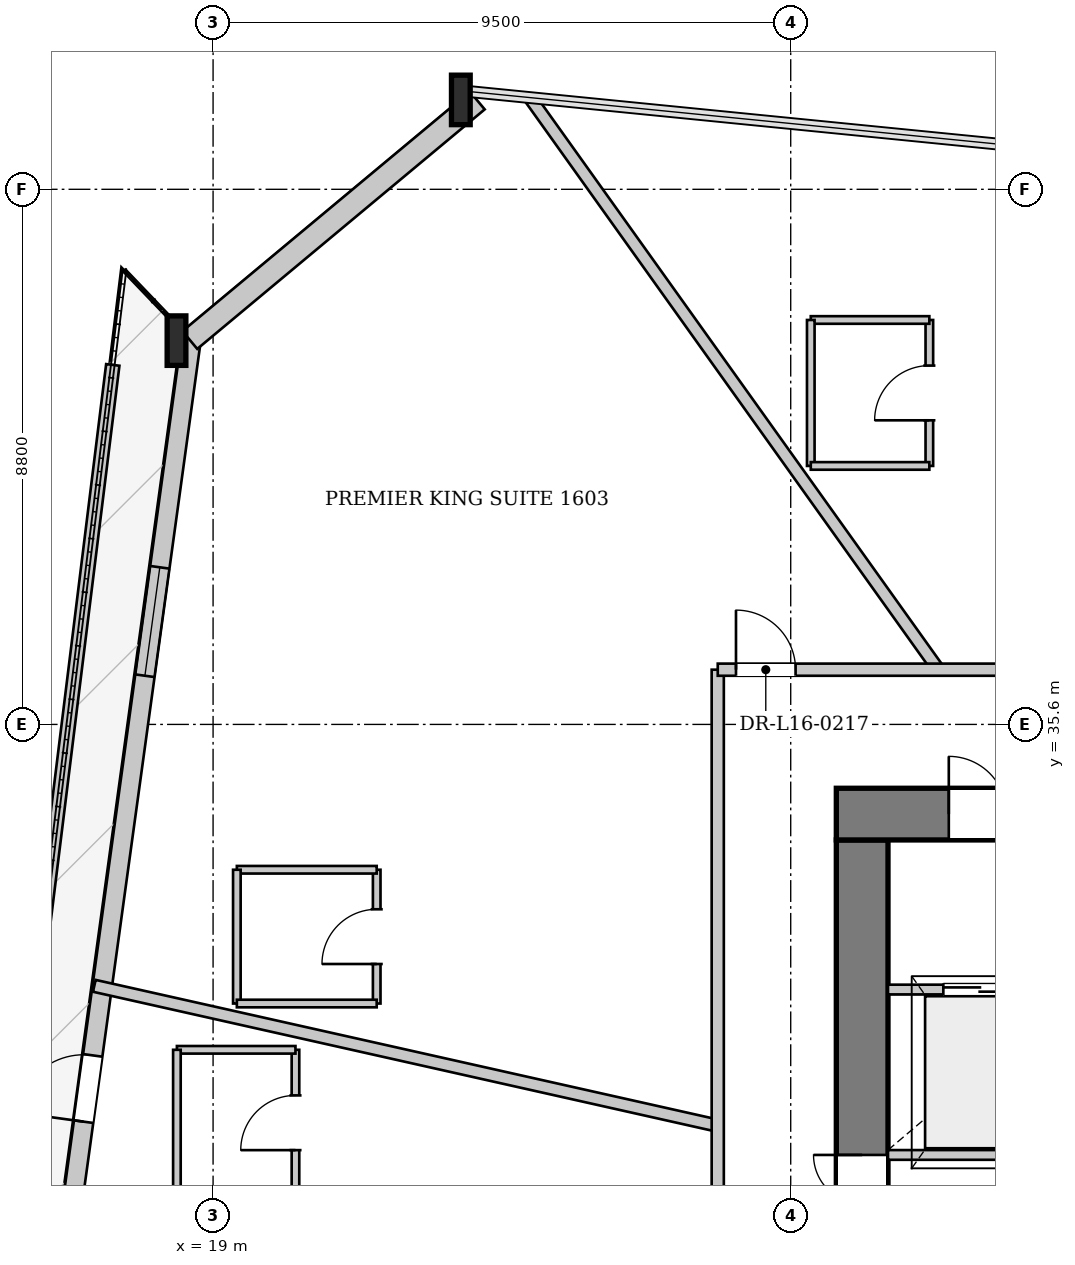
"""IFC4 building model, lengths in metres.
Left out: names, types, materials, properties, quantities, classifications, styles, units other than length and angle.
Written with IfcOpenShell. Run it as: python <this file> out.ifc"""

import sys

from ifc_helpers import new_model, si_unit, direction, frame, frame_2d, origin, origin_2d, place, context, subcontext, project, spatial, rectangle, i_section, extrude, source, transform, mapped, element, fill, save


model = new_model("IFC4")
c1 = context("Model", 3, precision=1e-05, world=origin(), true_north=direction((0.0, 1.0)))
c2 = subcontext(c1, "Body", "Model", "MODEL_VIEW")
j1 = project(units=[si_unit("LENGTHUNIT", "METRE"), si_unit("PLANEANGLEUNIT", "RADIAN")], contexts=[c1])
p1 = place(None, origin())
s1 = spatial("IfcSite", under=j1, at=p1, CompositionType="ELEMENT")
p2 = place(p1, origin())
s2 = spatial("IfcBuilding", under=s1, at=p2, CompositionType="ELEMENT")
p3 = place(p2, frame((0.0, 0.0, 64.8)))
s3 = spatial("IfcBuildingStorey", under=s2, at=p3, CompositionType="ELEMENT", Elevation=64.8)
m1 = source(origin(), c2, "Body", "SweptSolid", [
    extrude(i_section(OverallWidth=0.308, OverallDepth=0.814, WebThickness=0.021, FlangeThickness=0.04, at=origin_2d()), origin(), (0.0, 0.0, 1.0), 3.409),
])
p4 = place(p3, frame((23.224, 46.006, 0.0), z_axis=(-0.087656538504, -0.079922138048, 0.992939465983), x_axis=(0.673753857686, -0.738955843913, 0.0)))
e1 = element("IfcColumn", 1, at=p4, inside=s3, PredefinedType="COLUMN", context=c2, shape_type="MappedRepresentation", body=[
    mapped(m1, transform((0.0, 0.0, 0.0), x_axis=(1.0, 0.0, 0.0), y_axis=(0.0, 1.0, 0.0), z_axis=(0.0, 0.0, 1.0), scale=1.0)),
])
m2 = source(origin(), c2, "Body", "SweptSolid", [
    extrude(i_section(OverallWidth=0.308, OverallDepth=0.814, WebThickness=0.021, FlangeThickness=0.04, at=origin_2d()), origin(), (0.0, 0.0, 1.0), 3.405),
])
p5 = place(p3, frame((18.497, 42.067, 0.0), z_axis=(-0.057575852548, -0.091562096767, 0.994133493872), x_axis=(0.84654266508, -0.532320877102, 0.0)))
e2 = element("IfcColumn", 2, at=p5, inside=s3, PredefinedType="COLUMN", context=c2, shape_type="MappedRepresentation", body=[
    mapped(m2, transform((0.0, 0.0, 0.0), x_axis=(1.0, 0.0, 0.0), y_axis=(0.0, 1.0, 0.0), z_axis=(0.0, 0.0, 1.0), scale=1.0)),
])
p6 = place(p3, frame((16.141, 23.761, 0.0), z_axis=(0.0, 0.0, 1.0), x_axis=(0.136198703883, 0.990681539679, 0.0)))
e3 = element("IfcWall", 3, at=p6, inside=s3, PredefinedType="SOLIDWALL", context=c2, shape_type="SweptSolid", body=[
    extrude(rectangle(XDim=18.456, YDim=0.32, at=frame_2d((9.228, 0.0))), origin(), (0.0, 0.0, 1.0), 2.592),
])
p7 = place(p6, frame((5.356, 0.0, 0.0)))
e4 = element("IfcOpeningElement", 4, at=p7, cuts=e3, PredefinedType="OPENING", context=c2, shape_type="SweptSolid", body=[
    extrude(rectangle(XDim=1.1, YDim=2.3, at=frame_2d((0.55, 1.15))), frame((0.0, 0.17, 0.0), z_axis=(0.0, -1.0, 0.0), x_axis=(1.0, 0.0, 0.0)), (0.0, 0.0, 1.0), 0.34),
])
p8 = place(p6, frame((12.758, 0.0, 0.272)))
e5 = element("IfcOpeningElement", 5, at=p8, cuts=e3, PredefinedType="OPENING", context=c2, shape_type="SweptSolid", body=[
    extrude(rectangle(XDim=1.8, YDim=2.2, at=frame_2d((0.9, 1.1))), frame((0.0, 0.17, 0.0), z_axis=(0.0, -1.0, 0.0), x_axis=(1.0, 0.0, 0.0)), (0.0, 0.0, 1.0), 0.34),
])
p9 = place(p3, frame((18.618, 41.921, 0.0), z_axis=(0.0, 0.0, 1.0), x_axis=(0.768273310294, 0.640121957668, 0.0)))
e6 = element("IfcWall", 6, at=p9, inside=s3, PredefinedType="SOLIDWALL", context=c2, shape_type="SweptSolid", body=[
    extrude(rectangle(XDim=6.154, YDim=0.38, at=frame_2d((3.077, 0.0))), origin(), (0.0, 0.0, 1.0), 2.592),
])
p10 = place(p3, frame((17.351, 41.512, 0.0), z_axis=(0.0, 0.0, 1.0), x_axis=(-0.122727522737, -0.992440403834, 0.0)))
e7 = element("IfcWall", 7, at=p10, inside=s3, PredefinedType="PARAPET", context=c2, shape_type="SweptSolid", body=[
    extrude(rectangle(XDim=16.414, YDim=0.22, at=frame_2d((8.207, 0.0))), origin(), (0.0, 0.0, 1.0), 0.3),
])
p11 = place(p3, frame((29.675, 19.5, 0.0), z_axis=(0.0, 0.0, 1.0), x_axis=(0.0, 1.0, 0.0)))
e8 = element("IfcWall", 8, at=p11, inside=s3, PredefinedType="SHEAR", context=c2, shape_type="SweptSolid", body=[
    extrude(rectangle(XDim=14.2, YDim=0.85, at=frame_2d((7.1, 0.0))), origin(), (0.0, 0.0, 1.0), 3.3),
])
p12 = place(p11, frame((7.42, 0.0, 0.0)))
e9 = element("IfcOpeningElement", 9, at=p12, cuts=e8, PredefinedType="OPENING", context=c2, shape_type="SweptSolid", body=[
    extrude(rectangle(XDim=1.6, YDim=2.2, at=frame_2d((0.8, 1.1))), frame((0.0, 0.435, 0.0), z_axis=(0.0, -1.0, 0.0), x_axis=(1.0, 0.0, 0.0)), (0.0, 0.0, 1.0), 0.87),
])
p13 = place(p3, frame((29.25, 34.125, 0.0), z_axis=(0.0, 0.0, 1.0), x_axis=(1.0, 0.0, 0.0)))
e10 = element("IfcWall", 10, at=p13, inside=s3, PredefinedType="SHEAR", context=c2, shape_type="SweptSolid", body=[
    extrude(rectangle(XDim=17.5, YDim=0.85, at=frame_2d((8.75, 0.0))), origin(), (0.0, 0.0, 1.0), 3.3),
])
p14 = place(p13, frame((1.85, 0.0, 0.0)))
e11 = element("IfcOpeningElement", 11, at=p14, cuts=e10, PredefinedType="OPENING", context=c2, shape_type="SweptSolid", body=[
    extrude(rectangle(XDim=0.95, YDim=2.1, at=frame_2d((0.475, 1.05))), frame((0.0, 0.435, 0.0), z_axis=(0.0, -1.0, 0.0), x_axis=(1.0, 0.0, 0.0)), (0.0, 0.0, 1.0), 0.87),
])
p15 = place(p13, frame((4.23, 0.0, 0.0)))
e12 = element("IfcOpeningElement", 12, at=p15, cuts=e10, PredefinedType="OPENING", context=c2, shape_type="SweptSolid", body=[
    extrude(rectangle(XDim=1.32, YDim=2.2, at=frame_2d((0.66, 1.1))), frame((0.0, 0.435, 0.0), z_axis=(0.0, -1.0, 0.0), x_axis=(1.0, 0.0, 0.0)), (0.0, 0.0, 1.0), 0.87),
])
p16 = place(p13, frame((15.3, 0.0, 0.0)))
e13 = element("IfcOpeningElement", 13, at=p16, cuts=e10, PredefinedType="OPENING", context=c2, shape_type="SweptSolid", body=[
    extrude(rectangle(XDim=0.95, YDim=2.1, at=frame_2d((0.475, 1.05))), frame((0.0, 0.435, 0.0), z_axis=(0.0, -1.0, 0.0), x_axis=(1.0, 0.0, 0.0)), (0.0, 0.0, 1.0), 0.87),
])
p17 = place(p3, frame((30.1, 28.52, 0.0), z_axis=(0.0, 0.0, 1.0), x_axis=(1.0, 0.0, 0.0)))
e14 = element("IfcWall", 14, at=p17, inside=s3, PredefinedType="PARTITIONING", context=c2, shape_type="SweptSolid", body=[
    extrude(rectangle(XDim=3.02, YDim=0.16, at=frame_2d((1.51, 0.0))), origin(), (0.0, 0.0, 1.0), 3.3),
])
p18 = place(p3, frame((30.1, 31.24, 0.0), z_axis=(0.0, 0.0, 1.0), x_axis=(1.0, 0.0, 0.0)))
e15 = element("IfcWall", 15, at=p18, inside=s3, PredefinedType="PARTITIONING", context=c2, shape_type="SweptSolid", body=[
    extrude(rectangle(XDim=3.02, YDim=0.16, at=frame_2d((1.51, 0.0))), origin(), (0.0, 0.0, 1.0), 3.3),
])
p19 = place(p18, frame((0.91, 0.0, 0.0)))
e16 = element("IfcOpeningElement", 16, at=p19, cuts=e15, PredefinedType="OPENING", context=c2, shape_type="SweptSolid", body=[
    extrude(rectangle(XDim=1.2, YDim=2.2, at=frame_2d((0.6, 1.1))), frame((0.0, 0.09, 0.0), z_axis=(0.0, -1.0, 0.0), x_axis=(1.0, 0.0, 0.0)), (0.0, 0.0, 1.0), 0.18),
])
p20 = place(p3, frame((30.929, 36.5, 0.0), z_axis=(0.0, 0.0, 1.0), x_axis=(-0.581222159054, 0.8137449243, 0.0)))
e17 = element("IfcWall", 17, at=p20, inside=s3, PredefinedType="PARTITIONING", context=c2, shape_type="SweptSolid", body=[
    extrude(rectangle(XDim=11.522, YDim=0.2, at=frame_2d((5.761, 0.0))), origin(), (0.0, 0.0, 1.0), 3.3),
])
p21 = place(p3, frame((27.3, 29.0, 0.0), z_axis=(0.0, 0.0, 1.0), x_axis=(-0.975741680271, 0.218925040554, 0.0)))
e18 = element("IfcWall", 18, at=p21, inside=s3, PredefinedType="PARTITIONING", context=c2, shape_type="SweptSolid", body=[
    extrude(rectangle(XDim=10.508, YDim=0.2, at=frame_2d((5.254, 0.0))), origin(), (0.0, 0.0, 1.0), 3.3),
])
p22 = place(p3, frame((30.78, 39.851, 0.0), z_axis=(0.0, 0.0, 1.0), x_axis=(0.0, 1.0, 0.0)))
e19 = element("IfcWall", 19, at=p22, inside=s3, PredefinedType="PARTITIONING", context=c2, shape_type="SweptSolid", body=[
    extrude(rectangle(XDim=2.4, YDim=0.125, at=frame_2d((1.2, 0.0))), origin(), (0.0, 0.0, 1.0), 3.3),
])
p23 = place(p22, frame((0.75, 0.0, 0.0)))
e20 = element("IfcOpeningElement", 20, at=p23, cuts=e19, PredefinedType="OPENING", context=c2, shape_type="SweptSolid", body=[
    extrude(rectangle(XDim=0.9, YDim=2.1, at=frame_2d((0.45, 1.05))), frame((0.0, 0.073, 0.0), z_axis=(0.0, -1.0, 0.0), x_axis=(1.0, 0.0, 0.0)), (0.0, 0.0, 1.0), 0.145),
])
p24 = place(p3, frame((30.78, 42.251, 0.0), z_axis=(0.0, 0.0, 1.0), x_axis=(-1.0, 0.0, 0.0)))
e21 = element("IfcWall", 21, at=p24, inside=s3, PredefinedType="PARTITIONING", context=c2, shape_type="SweptSolid", body=[
    extrude(rectangle(XDim=1.95, YDim=0.125, at=frame_2d((0.975, 0.0))), origin(), (0.0, 0.0, 1.0), 3.3),
])
p25 = place(p3, frame((28.83, 42.251, 0.0), z_axis=(0.0, 0.0, 1.0), x_axis=(0.0, -1.0, 0.0)))
e22 = element("IfcWall", 22, at=p25, inside=s3, PredefinedType="PARTITIONING", context=c2, shape_type="SweptSolid", body=[
    extrude(rectangle(XDim=2.4, YDim=0.125, at=frame_2d((1.2, 0.0))), origin(), (0.0, 0.0, 1.0), 3.3),
])
p26 = place(p3, frame((28.83, 39.851, 0.0), z_axis=(0.0, 0.0, 1.0), x_axis=(1.0, 0.0, 0.0)))
e23 = element("IfcWall", 23, at=p26, inside=s3, PredefinedType="PARTITIONING", context=c2, shape_type="SweptSolid", body=[
    extrude(rectangle(XDim=1.95, YDim=0.125, at=frame_2d((0.975, 0.0))), origin(), (0.0, 0.0, 1.0), 3.3),
])
p27 = place(p3, frame((21.691, 31.01, 0.0), z_axis=(0.0, 0.0, 1.0), x_axis=(0.0, 1.0, 0.0)))
e24 = element("IfcWall", 24, at=p27, inside=s3, PredefinedType="PARTITIONING", context=c2, shape_type="SweptSolid", body=[
    extrude(rectangle(XDim=2.2, YDim=0.125, at=frame_2d((1.1, 0.0))), origin(), (0.0, 0.0, 1.0), 3.3),
])
p28 = place(p27, frame((0.65, 0.0, 0.0)))
e25 = element("IfcOpeningElement", 25, at=p28, cuts=e24, PredefinedType="OPENING", context=c2, shape_type="SweptSolid", body=[
    extrude(rectangle(XDim=0.9, YDim=2.1, at=frame_2d((0.45, 1.05))), frame((0.0, 0.073, 0.0), z_axis=(0.0, -1.0, 0.0), x_axis=(1.0, 0.0, 0.0)), (0.0, 0.0, 1.0), 0.145),
])
p29 = place(p3, frame((21.691, 33.21, 0.0), z_axis=(0.0, 0.0, 1.0), x_axis=(-1.0, 0.0, 0.0)))
e26 = element("IfcWall", 26, at=p29, inside=s3, PredefinedType="PARTITIONING", context=c2, shape_type="SweptSolid", body=[
    extrude(rectangle(XDim=2.3, YDim=0.125, at=frame_2d((1.15, 0.0))), origin(), (0.0, 0.0, 1.0), 3.3),
])
p30 = place(p3, frame((19.391, 33.21, 0.0), z_axis=(0.0, 0.0, 1.0), x_axis=(0.0, -1.0, 0.0)))
e27 = element("IfcWall", 27, at=p30, inside=s3, PredefinedType="PARTITIONING", context=c2, shape_type="SweptSolid", body=[
    extrude(rectangle(XDim=2.2, YDim=0.125, at=frame_2d((1.1, 0.0))), origin(), (0.0, 0.0, 1.0), 3.3),
])
p31 = place(p3, frame((19.391, 31.01, 0.0), z_axis=(0.0, 0.0, 1.0), x_axis=(1.0, 0.0, 0.0)))
e28 = element("IfcWall", 28, at=p31, inside=s3, PredefinedType="PARTITIONING", context=c2, shape_type="SweptSolid", body=[
    extrude(rectangle(XDim=2.3, YDim=0.125, at=frame_2d((1.15, 0.0))), origin(), (0.0, 0.0, 1.0), 3.3),
])
p32 = place(p3, frame((20.355, 27.849, 0.0), z_axis=(0.0, 0.0, 1.0), x_axis=(0.0, 1.0, 0.0)))
e29 = element("IfcWall", 29, at=p32, inside=s3, PredefinedType="PARTITIONING", context=c2, shape_type="SweptSolid", body=[
    extrude(rectangle(XDim=2.4, YDim=0.125, at=frame_2d((1.2, 0.0))), origin(), (0.0, 0.0, 1.0), 3.3),
])
p33 = place(p32, frame((0.75, 0.0, 0.0)))
e30 = element("IfcOpeningElement", 30, at=p33, cuts=e29, PredefinedType="OPENING", context=c2, shape_type="SweptSolid", body=[
    extrude(rectangle(XDim=0.9, YDim=2.1, at=frame_2d((0.45, 1.05))), frame((0.0, 0.073, 0.0), z_axis=(0.0, -1.0, 0.0), x_axis=(1.0, 0.0, 0.0)), (0.0, 0.0, 1.0), 0.145),
])
p34 = place(p3, frame((20.355, 30.249, 0.0), z_axis=(0.0, 0.0, 1.0), x_axis=(-1.0, 0.0, 0.0)))
e31 = element("IfcWall", 31, at=p34, inside=s3, PredefinedType="PARTITIONING", context=c2, shape_type="SweptSolid", body=[
    extrude(rectangle(XDim=1.95, YDim=0.125, at=frame_2d((0.975, 0.0))), origin(), (0.0, 0.0, 1.0), 3.3),
])
p35 = place(p3, frame((18.405, 30.249, 0.0), z_axis=(0.0, 0.0, 1.0), x_axis=(0.0, -1.0, 0.0)))
e32 = element("IfcWall", 32, at=p35, inside=s3, PredefinedType="PARTITIONING", context=c2, shape_type="SweptSolid", body=[
    extrude(rectangle(XDim=2.4, YDim=0.125, at=frame_2d((1.2, 0.0))), origin(), (0.0, 0.0, 1.0), 3.3),
])
p36 = place(p3, frame((27.3, 16.7, 0.0), z_axis=(0.0, 0.0, 1.0), x_axis=(0.0, 1.0, 0.0)))
e33 = element("IfcWall", 33, at=p36, inside=s3, PredefinedType="PARTITIONING", context=c2, shape_type="SweptSolid", body=[
    extrude(rectangle(XDim=19.8, YDim=0.2, at=frame_2d((9.9, 0.0))), origin(), (0.0, 0.0, 1.0), 3.3),
])
p37 = place(p36, frame((8.604, 0.0, 0.0)))
e34 = element("IfcOpeningElement", 34, at=p37, cuts=e33, PredefinedType="OPENING", context=c2, shape_type="SweptSolid", body=[
    extrude(rectangle(XDim=0.98, YDim=2.15, at=frame_2d((0.49, 1.075))), frame((0.0, 0.11, 0.0), z_axis=(0.0, -1.0, 0.0), x_axis=(1.0, 0.0, 0.0)), (0.0, 0.0, 1.0), 0.22),
])
p38 = place(p36, frame((0.3, 0.0, 0.0)))
e35 = element("IfcOpeningElement", 35, at=p38, cuts=e33, PredefinedType="OPENING", context=c2, shape_type="SweptSolid", body=[
    extrude(rectangle(XDim=0.98, YDim=2.15, at=frame_2d((0.49, 1.075))), frame((0.0, 0.11, 0.0), z_axis=(0.0, -1.0, 0.0), x_axis=(1.0, 0.0, 0.0)), (0.0, 0.0, 1.0), 0.22),
])
p39 = place(p3, frame((27.3, 36.5, 0.0), z_axis=(0.0, 0.0, 1.0), x_axis=(1.0, 0.0, 0.0)))
e36 = element("IfcWall", 36, at=p39, inside=s3, PredefinedType="PARTITIONING", context=c2, shape_type="SweptSolid", body=[
    extrude(rectangle(XDim=21.4, YDim=0.2, at=frame_2d((10.7, 0.0))), origin(), (0.0, 0.0, 1.0), 3.3),
])
p40 = place(p39, frame((19.202, 0.0, 0.0)))
e37 = element("IfcOpeningElement", 37, at=p40, cuts=e36, PredefinedType="OPENING", context=c2, shape_type="SweptSolid", body=[
    extrude(rectangle(XDim=0.98, YDim=2.15, at=frame_2d((0.49, 1.075))), frame((0.0, 0.11, 0.0), z_axis=(0.0, -1.0, 0.0), x_axis=(1.0, 0.0, 0.0)), (0.0, 0.0, 1.0), 0.22),
])
p41 = place(p39, frame((7.435, 0.0, 0.0)))
e38 = element("IfcOpeningElement", 38, at=p41, cuts=e36, PredefinedType="OPENING", context=c2, shape_type="SweptSolid", body=[
    extrude(rectangle(XDim=0.98, YDim=2.15, at=frame_2d((0.49, 1.075))), frame((0.0, 0.11, 0.0), z_axis=(0.0, -1.0, 0.0), x_axis=(1.0, 0.0, 0.0)), (0.0, 0.0, 1.0), 0.22),
])
p42 = place(p39, frame((0.3, 0.0, 0.0)))
e39 = element("IfcOpeningElement", 39, at=p42, cuts=e36, PredefinedType="OPENING", context=c2, shape_type="SweptSolid", body=[
    extrude(rectangle(XDim=0.98, YDim=2.15, at=frame_2d((0.49, 1.075))), frame((0.0, 0.11, 0.0), z_axis=(0.0, -1.0, 0.0), x_axis=(1.0, 0.0, 0.0)), (0.0, 0.0, 1.0), 0.22),
])
m3 = source(origin(), c2, "Body", "SweptSolid", [
    extrude(rectangle(XDim=1.1, YDim=2.3, at=frame_2d((0.55, 1.15))), frame((0.0, 0.025, 0.0), z_axis=(0.0, -1.0, 0.0), x_axis=(1.0, 0.0, 0.0)), (0.0, 0.0, 1.0), 0.05),
])
p43 = place(p7, origin())
e40 = element("IfcDoor", 40, at=p43, inside=s3, OperationType="SINGLE_SWING_LEFT", PredefinedType="DOOR", context=c2, shape_type="MappedRepresentation", body=[
    mapped(m3, transform((0.0, 0.0, 0.0), x_axis=(1.0, 0.0, 0.0), y_axis=(0.0, 1.0, 0.0), z_axis=(0.0, 0.0, 1.0), scale=1.0)),
])
fill(e4, e40)
m4 = source(origin(), c2, "Body", "SweptSolid", [
    extrude(rectangle(XDim=1.8, YDim=2.2, at=frame_2d((0.9, 1.1))), frame((0.0, 0.03, 0.0), z_axis=(0.0, -1.0, 0.0), x_axis=(1.0, 0.0, 0.0)), (0.0, 0.0, 1.0), 0.06),
])
p44 = place(p8, origin())
e41 = element("IfcWindow", 41, at=p44, inside=s3, PartitioningType="SINGLE_PANEL", PredefinedType="WINDOW", context=c2, shape_type="MappedRepresentation", body=[
    mapped(m4, transform((0.0, 0.0, 0.0), x_axis=(1.0, 0.0, 0.0), y_axis=(0.0, 1.0, 0.0), z_axis=(0.0, 0.0, 1.0), scale=1.0)),
])
fill(e5, e41)
m5 = source(origin(), c2, "Body", "SweptSolid", [
    extrude(rectangle(XDim=1.6, YDim=2.2, at=frame_2d((0.8, 1.1))), frame((0.0, 0.025, 0.0), z_axis=(0.0, -1.0, 0.0), x_axis=(1.0, 0.0, 0.0)), (0.0, 0.0, 1.0), 0.05),
])
p45 = place(p12, origin())
e42 = element("IfcDoor", 42, at=p45, inside=s3, OperationType="DOUBLE_DOOR_SINGLE_SWING", PredefinedType="DOOR", context=c2, shape_type="MappedRepresentation", body=[
    mapped(m5, transform((0.0, 0.0, 0.0), x_axis=(1.0, 0.0, 0.0), y_axis=(0.0, 1.0, 0.0), z_axis=(0.0, 0.0, 1.0), scale=1.0)),
])
fill(e9, e42)
m6 = source(origin(), c2, "Body", "SweptSolid", [
    extrude(rectangle(XDim=0.95, YDim=2.1, at=frame_2d((0.475, 1.05))), frame((0.0, 0.025, 0.0), z_axis=(0.0, -1.0, 0.0), x_axis=(1.0, 0.0, 0.0)), (0.0, 0.0, 1.0), 0.05),
])
p46 = place(p14, origin())
e43 = element("IfcDoor", 43, at=p46, inside=s3, OperationType="SINGLE_SWING_LEFT", PredefinedType="DOOR", context=c2, shape_type="MappedRepresentation", body=[
    mapped(m6, transform((0.0, 0.0, 0.0), x_axis=(1.0, 0.0, 0.0), y_axis=(0.0, 1.0, 0.0), z_axis=(0.0, 0.0, 1.0), scale=1.0)),
])
fill(e11, e43)
m7 = source(origin(), c2, "Body", "SweptSolid", [
    extrude(rectangle(XDim=1.2, YDim=2.2, at=frame_2d((0.6, 1.1))), frame((0.0, 0.025, 0.0), z_axis=(0.0, -1.0, 0.0), x_axis=(1.0, 0.0, 0.0)), (0.0, 0.0, 1.0), 0.05),
])
p47 = place(p19, origin())
e44 = element("IfcDoor", 44, at=p47, inside=s3, OperationType="DOUBLE_DOOR_SLIDING", PredefinedType="DOOR", context=c2, shape_type="MappedRepresentation", body=[
    mapped(m7, transform((0.0, 0.0, 0.0), x_axis=(1.0, 0.0, 0.0), y_axis=(0.0, 1.0, 0.0), z_axis=(0.0, 0.0, 1.0), scale=1.0)),
])
fill(e16, e44)
m8 = source(origin(), c2, "Body", "SweptSolid", [
    extrude(rectangle(XDim=0.9, YDim=2.1, at=frame_2d((0.45, 1.05))), frame((0.0, 0.025, 0.0), z_axis=(0.0, -1.0, 0.0), x_axis=(1.0, 0.0, 0.0)), (0.0, 0.0, 1.0), 0.05),
])
p48 = place(p23, origin())
e45 = element("IfcDoor", 45, at=p48, inside=s3, OperationType="SINGLE_SWING_LEFT", PredefinedType="DOOR", context=c2, shape_type="MappedRepresentation", body=[
    mapped(m8, transform((0.0, 0.0, 0.0), x_axis=(1.0, 0.0, 0.0), y_axis=(0.0, 1.0, 0.0), z_axis=(0.0, 0.0, 1.0), scale=1.0)),
])
fill(e20, e45)
p49 = place(p28, origin())
e46 = element("IfcDoor", 46, at=p49, inside=s3, OperationType="SINGLE_SWING_LEFT", PredefinedType="DOOR", context=c2, shape_type="MappedRepresentation", body=[
    mapped(m8, transform((0.0, 0.0, 0.0), x_axis=(1.0, 0.0, 0.0), y_axis=(0.0, 1.0, 0.0), z_axis=(0.0, 0.0, 1.0), scale=1.0)),
])
fill(e25, e46)
p50 = place(p33, origin())
e47 = element("IfcDoor", 47, at=p50, inside=s3, OperationType="SINGLE_SWING_LEFT", PredefinedType="DOOR", context=c2, shape_type="MappedRepresentation", body=[
    mapped(m8, transform((0.0, 0.0, 0.0), x_axis=(1.0, 0.0, 0.0), y_axis=(0.0, 1.0, 0.0), z_axis=(0.0, 0.0, 1.0), scale=1.0)),
])
fill(e30, e47)
m9 = source(origin(), c2, "Body", "SweptSolid", [
    extrude(rectangle(XDim=0.98, YDim=2.15, at=frame_2d((0.49, 1.075))), frame((0.0, 0.025, 0.0), z_axis=(0.0, -1.0, 0.0), x_axis=(1.0, 0.0, 0.0)), (0.0, 0.0, 1.0), 0.05),
])
p51 = place(p42, origin())
e48 = element("IfcDoor", 48, at=p51, inside=s3, OperationType="SINGLE_SWING_LEFT", PredefinedType="DOOR", context=c2, shape_type="MappedRepresentation", body=[
    mapped(m9, transform((0.0, 0.0, 0.0), x_axis=(1.0, 0.0, 0.0), y_axis=(0.0, 1.0, 0.0), z_axis=(0.0, 0.0, 1.0), scale=1.0)),
])
fill(e39, e48)
save(model, sys.argv[1])
